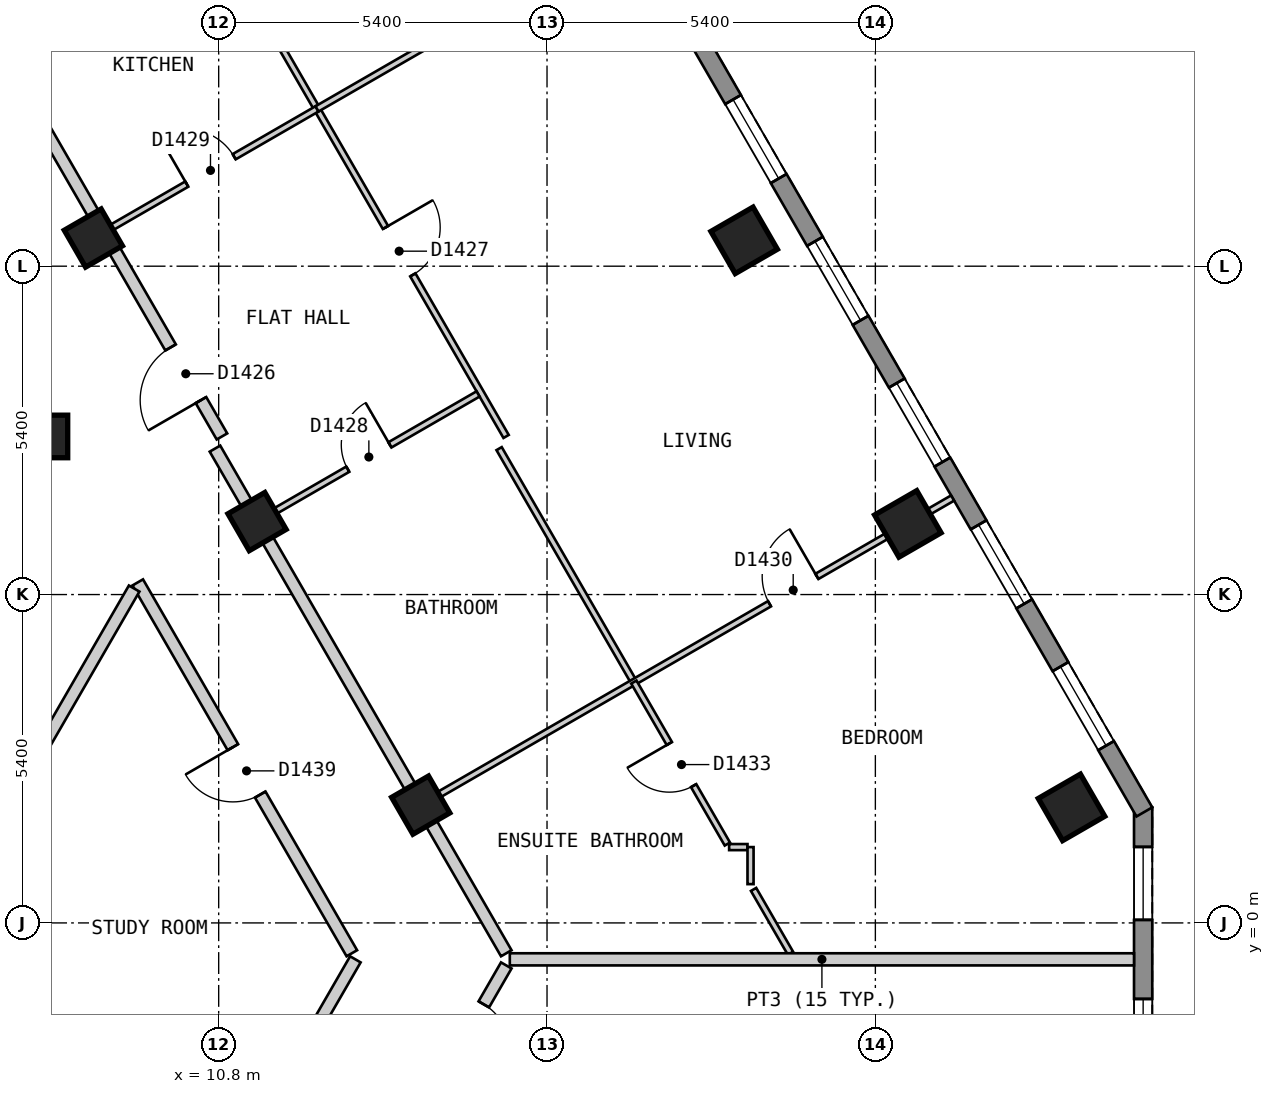
"""IFC4 building model, lengths in metres.
Left out: names, types, materials, properties, quantities, classifications, styles, units other than length and angle.
Written with IfcOpenShell. Run it as: python <this file> out.ifc"""

import sys

from ifc_helpers import new_model, si_unit, direction, frame, frame_2d, origin, origin_2d, place, context, subcontext, project, spatial, polyline, rectangle, outline, extrude, element, fill, save


model = new_model("IFC4")
c1 = context("Model", 3, precision=1e-05, world=origin(), true_north=direction((0.0, 1.0)))
c2 = subcontext(c1, "Body", "Model", "MODEL_VIEW")
j1 = project(units=[si_unit("LENGTHUNIT", "METRE"), si_unit("PLANEANGLEUNIT", "RADIAN")], contexts=[c1])
p1 = place(None, origin())
s1 = spatial("IfcSite", under=j1, at=p1, CompositionType="ELEMENT")
p2 = place(p1, origin())
s2 = spatial("IfcBuilding", under=s1, at=p2, CompositionType="ELEMENT")
p3 = place(p2, frame((0.0, 0.0, 178.2)))
s3 = spatial("IfcBuildingStorey", under=s2, at=p3, CompositionType="ELEMENT", Elevation=178.2)
for number, where, z_axis, x_axis in (
    (1, (24.826, 1.9, 0.0), (0.0, 0.0, 1.0), (-0.5, 0.866, 0.0)),
    (2, (22.134, 6.562, 0.0), (0.0, 0.0, 1.0), (-0.5, 0.866, 0.0)),
    (3, (19.442, 11.225, 0.0), (0.0, 0.0, 1.0), (-0.5, 0.866, 0.0)),
):
    element("IfcColumn", number, at=place(p3, frame(where, z_axis=z_axis, x_axis=x_axis)), inside=s3, PredefinedType="COLUMN", context=c2, shape_type="SweptSolid", body=[
        extrude(rectangle(XDim=0.8, YDim=0.8, at=origin_2d()), origin(), (0.0, 0.0, 1.0), 3.0),
    ])
for number, where, z_axis, x_axis in (
    (4, (14.123, 1.937, 0.0), (0.0, 0.0, 1.0), (-0.5, 0.866, 0.0)),
    (5, (11.431, 6.6, 0.0), (0.0, 0.0, 1.0), (-0.5, 0.866, 0.0)),
    (6, (7.967, 8.0, 0.0), (0.0, 0.0, 1.0), (1.0, 0.0, 0.0)),
    (7, (8.739, 11.263, 0.0), (0.0, 0.0, 1.0), (-0.5, 0.866, 0.0)),
):
    element("IfcColumn", number, at=place(p3, frame(where, z_axis=z_axis, x_axis=x_axis)), inside=s3, PredefinedType="COLUMN", context=c2, shape_type="SweptSolid", body=[
        extrude(rectangle(XDim=0.7, YDim=0.7, at=origin_2d()), origin(), (0.0, 0.0, 1.0), 3.0),
    ])
p4 = place(p3, frame((26.004, -3.1, 0.0), z_axis=(0.0, 0.0, 1.0), x_axis=(0.0, 1.0, 0.0)))
e8 = element("IfcWall", 8, at=p4, inside=s3, PredefinedType="SOLIDWALL", context=c2, shape_type="SweptSolid", body=[
    extrude(outline(polyline([(0.0, -0.15), (5.0, -0.15), (4.92, 0.15), (0.08, 0.15), (0.0, -0.15)])), origin(), (0.0, 0.0, 1.0), 2.7),
])
p5 = place(p4, frame((0.65, 0.0, 0.15)))
e9 = element("IfcOpeningElement", 9, at=p5, cuts=e8, PredefinedType="OPENING", context=c2, shape_type="SweptSolid", body=[
    extrude(rectangle(XDim=1.2, YDim=2.1, at=frame_2d((0.6, 1.05))), frame((0.0, 0.16, 0.0), z_axis=(0.0, -1.0, 0.0), x_axis=(1.0, 0.0, 0.0)), (0.0, 0.0, 1.0), 0.32),
])
p6 = place(p4, frame((3.15, 0.0, 0.15)))
e10 = element("IfcOpeningElement", 10, at=p6, cuts=e8, PredefinedType="OPENING", context=c2, shape_type="SweptSolid", body=[
    extrude(rectangle(XDim=1.2, YDim=2.1, at=frame_2d((0.6, 1.05))), frame((0.0, 0.16, 0.0), z_axis=(0.0, -1.0, 0.0), x_axis=(1.0, 0.0, 0.0)), (0.0, 0.0, 1.0), 0.32),
])
p7 = place(p3, frame((26.024, 1.825, 0.0), z_axis=(0.0, 0.0, 1.0), x_axis=(-0.500010537973, 0.866019319597, 0.0)))
e11 = element("IfcWall", 11, at=p7, inside=s3, PredefinedType="SOLIDWALL", context=c2, shape_type="SweptSolid", body=[
    extrude(outline(polyline([(0.0, -0.15), (22.863, -0.15), (22.783, 0.15), (0.08, 0.15), (0.0, -0.15)])), origin(), (0.0, 0.0, 1.0), 2.7),
])
p8 = place(p7, frame((1.259, 0.0, 0.15)))
e12 = element("IfcOpeningElement", 12, at=p8, cuts=e11, PredefinedType="OPENING", context=c2, shape_type="SweptSolid", body=[
    extrude(rectangle(XDim=1.5, YDim=2.1, at=frame_2d((0.75, 1.05))), frame((0.0, 0.16, 0.0), z_axis=(0.0, -1.0, 0.0), x_axis=(1.0, 0.0, 0.0)), (0.0, 0.0, 1.0), 0.32),
])
p9 = place(p7, frame((3.952, 0.0, 0.15)))
e13 = element("IfcOpeningElement", 13, at=p9, cuts=e11, PredefinedType="OPENING", context=c2, shape_type="SweptSolid", body=[
    extrude(rectangle(XDim=1.5, YDim=2.1, at=frame_2d((0.75, 1.05))), frame((0.0, 0.16, 0.0), z_axis=(0.0, -1.0, 0.0), x_axis=(1.0, 0.0, 0.0)), (0.0, 0.0, 1.0), 0.32),
])
p10 = place(p7, frame((6.644, 0.0, 0.15)))
e14 = element("IfcOpeningElement", 14, at=p10, cuts=e11, PredefinedType="OPENING", context=c2, shape_type="SweptSolid", body=[
    extrude(rectangle(XDim=1.5, YDim=2.1, at=frame_2d((0.75, 1.05))), frame((0.0, 0.16, 0.0), z_axis=(0.0, -1.0, 0.0), x_axis=(1.0, 0.0, 0.0)), (0.0, 0.0, 1.0), 0.32),
])
p11 = place(p7, frame((9.335, 0.0, 0.15)))
e15 = element("IfcOpeningElement", 15, at=p11, cuts=e11, PredefinedType="OPENING", context=c2, shape_type="SweptSolid", body=[
    extrude(rectangle(XDim=1.5, YDim=2.1, at=frame_2d((0.75, 1.05))), frame((0.0, 0.16, 0.0), z_axis=(0.0, -1.0, 0.0), x_axis=(1.0, 0.0, 0.0)), (0.0, 0.0, 1.0), 0.32),
])
p12 = place(p7, frame((12.028, 0.0, 0.15)))
e16 = element("IfcOpeningElement", 16, at=p12, cuts=e11, PredefinedType="OPENING", context=c2, shape_type="SweptSolid", body=[
    extrude(rectangle(XDim=1.5, YDim=2.1, at=frame_2d((0.75, 1.05))), frame((0.0, 0.16, 0.0), z_axis=(0.0, -1.0, 0.0), x_axis=(1.0, 0.0, 0.0)), (0.0, 0.0, 1.0), 0.32),
])
p13 = place(p7, frame((14.72, 0.0, 0.15)))
e17 = element("IfcOpeningElement", 17, at=p13, cuts=e11, PredefinedType="OPENING", context=c2, shape_type="SweptSolid", body=[
    extrude(rectangle(XDim=1.5, YDim=2.1, at=frame_2d((0.75, 1.05))), frame((0.0, 0.16, 0.0), z_axis=(0.0, -1.0, 0.0), x_axis=(1.0, 0.0, 0.0)), (0.0, 0.0, 1.0), 0.32),
])
p14 = place(p7, frame((17.411, 0.0, 0.15)))
e18 = element("IfcOpeningElement", 18, at=p14, cuts=e11, PredefinedType="OPENING", context=c2, shape_type="SweptSolid", body=[
    extrude(rectangle(XDim=1.5, YDim=2.1, at=frame_2d((0.75, 1.05))), frame((0.0, 0.16, 0.0), z_axis=(0.0, -1.0, 0.0), x_axis=(1.0, 0.0, 0.0)), (0.0, 0.0, 1.0), 0.32),
])
p15 = place(p7, frame((20.104, 0.0, 0.15)))
e19 = element("IfcOpeningElement", 19, at=p15, cuts=e11, PredefinedType="OPENING", context=c2, shape_type="SweptSolid", body=[
    extrude(rectangle(XDim=1.5, YDim=2.1, at=frame_2d((0.75, 1.05))), frame((0.0, 0.16, 0.0), z_axis=(0.0, -1.0, 0.0), x_axis=(1.0, 0.0, 0.0)), (0.0, 0.0, 1.0), 0.32),
])
p16 = place(p3, frame((9.469, 5.6, 0.0), z_axis=(0.0, 0.0, 1.0), x_axis=(0.499964524401, -0.866045884662, 0.0)))
e20 = element("IfcWall", 20, at=p16, inside=s3, PredefinedType="PARTITIONING", context=c2, shape_type="SweptSolid", body=[
    extrude(rectangle(XDim=7.042, YDim=0.2, at=frame_2d((3.521, 0.0))), origin(), (0.0, 0.0, 1.0), 2.7),
])
p17 = place(p16, frame((3.129, 0.0, 0.0)))
e21 = element("IfcOpeningElement", 21, at=p17, cuts=e20, PredefinedType="OPENING", context=c2, shape_type="SweptSolid", body=[
    extrude(rectangle(XDim=0.9, YDim=2.1, at=frame_2d((0.45, 1.05))), frame((0.0, 0.11, 0.0), z_axis=(0.0, -1.0, 0.0), x_axis=(1.0, 0.0, 0.0)), (0.0, 0.0, 1.0), 0.22),
])
p18 = place(p3, frame((10.739, 7.8, 0.0), z_axis=(0.0, 0.0, 1.0), x_axis=(0.499964311759, -0.86604600742, 0.0)))
e22 = element("IfcWall", 22, at=p18, inside=s3, PredefinedType="PARTITIONING", context=c2, shape_type="SweptSolid", body=[
    extrude(rectangle(XDim=9.583, YDim=0.2, at=frame_2d((4.792, 0.0))), origin(), (0.0, 0.0, 1.0), 2.7),
])
p19 = place(p3, frame((5.485, 17.3, 0.0), z_axis=(0.0, 0.0, 1.0), x_axis=(0.499965832213, -0.866045129667, 0.0)))
e23 = element("IfcWall", 23, at=p19, inside=s3, PredefinedType="PARTITIONING", context=c2, shape_type="SweptSolid", body=[
    extrude(rectangle(XDim=10.739, YDim=0.2, at=frame_2d((5.369, 0.0))), origin(), (0.0, 0.0, 1.0), 2.7),
])
p20 = place(p19, frame((9.048, 0.0, 0.0)))
e24 = element("IfcOpeningElement", 24, at=p20, cuts=e23, PredefinedType="OPENING", context=c2, shape_type="SweptSolid", body=[
    extrude(rectangle(XDim=1.0, YDim=2.1, at=frame_2d((0.5, 1.05))), frame((0.0, 0.11, 0.0), z_axis=(0.0, -1.0, 0.0), x_axis=(1.0, 0.0, 0.0)), (0.0, 0.0, 1.0), 0.22),
])
p21 = place(p19, frame((0.161, 0.0, 0.0)))
e25 = element("IfcOpeningElement", 25, at=p21, cuts=e23, PredefinedType="OPENING", context=c2, shape_type="SweptSolid", body=[
    extrude(rectangle(XDim=0.9, YDim=2.1, at=frame_2d((0.45, 1.05))), frame((0.0, 0.11, 0.0), z_axis=(0.0, -1.0, 0.0), x_axis=(1.0, 0.0, 0.0)), (0.0, 0.0, 1.0), 0.22),
])
p22 = place(p3, frame((7.028, 1.373, 0.0), z_axis=(0.0, 0.0, 1.0), x_axis=(0.499953126767, 0.866052464367, 0.0)))
e26 = element("IfcWall", 26, at=p22, inside=s3, PredefinedType="PARTITIONING", context=c2, shape_type="SweptSolid", body=[
    extrude(rectangle(XDim=4.764, YDim=0.2, at=frame_2d((2.382, 0.0))), origin(), (0.0, 0.0, 1.0), 2.7),
])
p23 = place(p3, frame((11.777, -2.8, 0.0), z_axis=(0.0, 0.0, 1.0), x_axis=(0.500085537782, 0.86597601289, 0.0)))
e27 = element("IfcWall", 27, at=p23, inside=s3, PredefinedType="PARTITIONING", context=c2, shape_type="SweptSolid", body=[
    extrude(rectangle(XDim=2.542, YDim=0.2, at=frame_2d((1.271, 0.0))), origin(), (0.0, 0.0, 1.0), 2.7),
])
p24 = place(p3, frame((14.318, -2.8, 0.0), z_axis=(0.0, 0.0, 1.0), x_axis=(0.49964693309, 0.866229151122, 0.0)))
e28 = element("IfcWall", 28, at=p24, inside=s3, PredefinedType="PARTITIONING", context=c2, shape_type="SweptSolid", body=[
    extrude(rectangle(XDim=2.426, YDim=0.2, at=frame_2d((1.213, 0.0))), origin(), (0.0, 0.0, 1.0), 2.7),
])
p25 = place(p24, frame((0.886, 0.0, 0.0)))
e29 = element("IfcOpeningElement", 29, at=p25, cuts=e28, PredefinedType="OPENING", context=c2, shape_type="SweptSolid", body=[
    extrude(rectangle(XDim=0.8, YDim=2.1, at=frame_2d((0.4, 1.05))), frame((0.0, 0.11, 0.0), z_axis=(0.0, -1.0, 0.0), x_axis=(1.0, 0.0, 0.0)), (0.0, 0.0, 1.0), 0.22),
])
p26 = place(p3, frame((15.412, 7.8, 0.0), z_axis=(0.0, 0.0, 1.0), x_axis=(0.499882970317, -0.866092960361, 0.0)))
e30 = element("IfcWall", 30, at=p26, inside=s3, PredefinedType="PARTITIONING", context=c2, shape_type="SweptSolid", body=[
    extrude(rectangle(XDim=4.433, YDim=0.1, at=frame_2d((2.216, 0.0))), origin(), (0.0, 0.0, 1.0), 2.7),
])
p27 = place(p3, frame((19.597, 0.551, 0.0), z_axis=(0.0, 0.0, 1.0), x_axis=(0.500576018574, -0.86569258379, 0.0)))
e31 = element("IfcWall", 31, at=p27, inside=s3, PredefinedType="PARTITIONING", context=c2, shape_type="SweptSolid", body=[
    extrude(rectangle(XDim=1.213, YDim=0.1, at=frame_2d((0.606, 0.0))), origin(), (0.0, 0.0, 1.0), 2.7),
])
p28 = place(p3, frame((9.827, 17.874, 0.0), z_axis=(0.0, 0.0, 1.0), x_axis=(0.499962189394, -0.866047232647, 0.0)))
e32 = element("IfcWall", 32, at=p28, inside=s3, PredefinedType="PARTITIONING", context=c2, shape_type="SweptSolid", body=[
    extrude(rectangle(XDim=11.401, YDim=0.1, at=frame_2d((5.701, 0.0))), origin(), (0.0, 0.0, 1.0), 2.7),
])
p29 = place(p28, frame((7.433, 0.0, 0.0)))
e33 = element("IfcOpeningElement", 33, at=p29, cuts=e32, PredefinedType="OPENING", context=c2, shape_type="SweptSolid", body=[
    extrude(rectangle(XDim=0.9, YDim=2.1, at=frame_2d((0.45, 1.05))), frame((0.0, 0.06, 0.0), z_axis=(0.0, -1.0, 0.0), x_axis=(1.0, 0.0, 0.0)), (0.0, 0.0, 1.0), 0.12),
])
p30 = place(p3, frame((19.195, 1.247, 0.0), z_axis=(0.0, 0.0, 1.0), x_axis=(1.0, 0.0, 0.0)))
e34 = element("IfcWall", 34, at=p30, inside=s3, PredefinedType="PARTITIONING", context=c2, shape_type="SweptSolid", body=[
    extrude(rectangle(XDim=0.302, YDim=0.1, at=frame_2d((0.151, 0.0))), origin(), (0.0, 0.0, 1.0), 2.7),
])
p31 = place(p3, frame((19.547, 0.638, 0.0), z_axis=(0.0, 0.0, 1.0), x_axis=(0.0, 1.0, 0.0)))
e35 = element("IfcWall", 35, at=p31, inside=s3, PredefinedType="PARTITIONING", context=c2, shape_type="SweptSolid", body=[
    extrude(rectangle(XDim=0.609, YDim=0.1, at=frame_2d((0.305, 0.0))), origin(), (0.0, 0.0, 1.0), 2.7),
])
p32 = place(p3, frame((14.21, 1.987, 0.0), z_axis=(0.0, 0.0, 1.0), x_axis=(0.866022959057, 0.500004234368, 0.0)))
e36 = element("IfcWall", 36, at=p32, inside=s3, PredefinedType="PARTITIONING", context=c2, shape_type="SweptSolid", body=[
    extrude(rectangle(XDim=10.0, YDim=0.1, at=frame_2d((5.0, 0.0))), origin(), (0.0, 0.0, 1.0), 2.7),
])
p33 = place(p32, frame((6.523, 0.0, 0.0)))
e37 = element("IfcOpeningElement", 37, at=p33, cuts=e36, PredefinedType="OPENING", context=c2, shape_type="SweptSolid", body=[
    extrude(rectangle(XDim=0.9, YDim=2.1, at=frame_2d((0.45, 1.05))), frame((0.0, 0.06, 0.0), z_axis=(0.0, -1.0, 0.0), x_axis=(1.0, 0.0, 0.0)), (0.0, 0.0, 1.0), 0.12),
])
p34 = place(p3, frame((11.518, 6.65, 0.0), z_axis=(0.0, 0.0, 1.0), x_axis=(0.865949381454, 0.500131651427, 0.0)))
e38 = element("IfcWall", 38, at=p34, inside=s3, PredefinedType="PARTITIONING", context=c2, shape_type="SweptSolid", body=[
    extrude(rectangle(XDim=4.097, YDim=0.1, at=frame_2d((2.049, 0.0))), origin(), (0.0, 0.0, 1.0), 2.7),
])
p35 = place(p34, frame((1.623, 0.0, 0.0)))
e39 = element("IfcOpeningElement", 39, at=p35, cuts=e38, PredefinedType="OPENING", context=c2, shape_type="SweptSolid", body=[
    extrude(rectangle(XDim=0.8, YDim=2.1, at=frame_2d((0.4, 1.05))), frame((0.0, 0.06, 0.0), z_axis=(0.0, -1.0, 0.0), x_axis=(1.0, 0.0, 0.0)), (0.0, 0.0, 1.0), 0.12),
])
p36 = place(p3, frame((8.999, 11.413, 0.0), z_axis=(0.0, 0.0, 1.0), x_axis=(0.865969252911, 0.500097243556, 0.0)))
e40 = element("IfcWall", 40, at=p36, inside=s3, PredefinedType="PARTITIONING", context=c2, shape_type="SweptSolid", body=[
    extrude(rectangle(XDim=3.947, YDim=0.1, at=frame_2d((1.974, 0.0))), origin(), (0.0, 0.0, 1.0), 2.7),
])
p37 = place(p36, frame((1.474, 0.0, 0.0)))
e41 = element("IfcOpeningElement", 41, at=p37, cuts=e40, PredefinedType="OPENING", context=c2, shape_type="SweptSolid", body=[
    extrude(rectangle(XDim=0.9, YDim=2.1, at=frame_2d((0.45, 1.05))), frame((0.0, 0.06, 0.0), z_axis=(0.0, -1.0, 0.0), x_axis=(1.0, 0.0, 0.0)), (0.0, 0.0, 1.0), 0.12),
])
p38 = place(p3, frame((15.588, -0.599, 0.0), z_axis=(0.0, 0.0, 1.0), x_axis=(1.0, 0.0, 0.0)))
e42 = element("IfcWall", 42, at=p38, inside=s3, PredefinedType="PARTITIONING", context=c2, shape_type="SweptSolid", body=[
    extrude(rectangle(XDim=10.266, YDim=0.2, at=frame_2d((5.133, 0.0))), origin(), (0.0, 0.0, 1.0), 2.7),
])
p39 = place(p3, frame((7.448, 14.1, 0.0), z_axis=(0.0, 0.0, 1.0), x_axis=(0.500013426303, 0.866017651966, 0.0)))
e43 = element("IfcWall", 43, at=p39, inside=s3, PredefinedType="PARTITIONING", context=c2, shape_type="SweptSolid", body=[
    extrude(rectangle(XDim=4.358, YDim=0.2, at=frame_2d((2.179, 0.0))), origin(), (0.0, 0.0, 1.0), 2.7),
])
p40 = place(p3, frame((17.628, 3.961, 0.0), z_axis=(0.0, 0.0, 1.0), x_axis=(0.50003162148, -0.866007146345, 0.0)))
e44 = element("IfcWall", 44, at=p40, inside=s3, PredefinedType="PARTITIONING", context=c2, shape_type="SweptSolid", body=[
    extrude(rectangle(XDim=3.076, YDim=0.1, at=frame_2d((1.538, 0.0))), origin(), (0.0, 0.0, 1.0), 2.7),
])
p41 = place(p40, frame((1.167, 0.0, 0.0)))
e45 = element("IfcOpeningElement", 45, at=p41, cuts=e44, PredefinedType="OPENING", context=c2, shape_type="SweptSolid", body=[
    extrude(rectangle(XDim=0.8, YDim=2.1, at=frame_2d((0.4, 1.05))), frame((0.0, 0.06, 0.0), z_axis=(0.0, -1.0, 0.0), x_axis=(1.0, 0.0, 0.0)), (0.0, 0.0, 1.0), 0.12),
])
p42 = place(p3, frame((12.417, 13.387, 0.0), z_axis=(0.0, 0.0, 1.0), x_axis=(0.866070981966, 0.499921047963, 0.0)))
e46 = element("IfcWall", 46, at=p42, inside=s3, PredefinedType="PARTITIONING", context=c2, shape_type="SweptSolid", body=[
    extrude(rectangle(XDim=5.853, YDim=0.1, at=frame_2d((2.927, 0.0))), origin(), (0.0, 0.0, 1.0), 2.7),
])
p43 = place(p42, frame((2.476, 0.0, 0.0)))
e47 = element("IfcOpeningElement", 47, at=p43, cuts=e46, PredefinedType="OPENING", context=c2, shape_type="SweptSolid", body=[
    extrude(rectangle(XDim=0.9, YDim=2.1, at=frame_2d((0.45, 1.05))), frame((0.0, 0.06, 0.0), z_axis=(0.0, -1.0, 0.0), x_axis=(1.0, 0.0, 0.0)), (0.0, 0.0, 1.0), 0.12),
])
p44 = place(p5, origin())
e48 = element("IfcWindow", 48, at=p44, inside=s3, PartitioningType="SINGLE_PANEL", PredefinedType="WINDOW", context=c2, shape_type="SweptSolid", body=[
    extrude(rectangle(XDim=1.2, YDim=2.1, at=frame_2d((0.6, 1.05))), frame((0.0, 0.03, 0.0), z_axis=(0.0, -1.0, 0.0), x_axis=(1.0, 0.0, 0.0)), (0.0, 0.0, 1.0), 0.06),
])
fill(e9, e48)
p45 = place(p6, origin())
e49 = element("IfcWindow", 49, at=p45, inside=s3, PartitioningType="SINGLE_PANEL", PredefinedType="WINDOW", context=c2, shape_type="SweptSolid", body=[
    extrude(rectangle(XDim=1.2, YDim=2.1, at=frame_2d((0.6, 1.05))), frame((0.0, 0.03, 0.0), z_axis=(0.0, -1.0, 0.0), x_axis=(1.0, 0.0, 0.0)), (0.0, 0.0, 1.0), 0.06),
])
fill(e10, e49)
p46 = place(p8, origin())
e50 = element("IfcWindow", 50, at=p46, inside=s3, PartitioningType="SINGLE_PANEL", PredefinedType="WINDOW", context=c2, shape_type="SweptSolid", body=[
    extrude(rectangle(XDim=1.5, YDim=2.1, at=frame_2d((0.75, 1.05))), frame((0.0, 0.03, 0.0), z_axis=(0.0, -1.0, 0.0), x_axis=(1.0, 0.0, 0.0)), (0.0, 0.0, 1.0), 0.06),
])
fill(e12, e50)
p47 = place(p9, origin())
e51 = element("IfcWindow", 51, at=p47, inside=s3, PartitioningType="SINGLE_PANEL", PredefinedType="WINDOW", context=c2, shape_type="SweptSolid", body=[
    extrude(rectangle(XDim=1.5, YDim=2.1, at=frame_2d((0.75, 1.05))), frame((0.0, 0.03, 0.0), z_axis=(0.0, -1.0, 0.0), x_axis=(1.0, 0.0, 0.0)), (0.0, 0.0, 1.0), 0.06),
])
fill(e13, e51)
p48 = place(p10, origin())
e52 = element("IfcWindow", 52, at=p48, inside=s3, PartitioningType="SINGLE_PANEL", PredefinedType="WINDOW", context=c2, shape_type="SweptSolid", body=[
    extrude(rectangle(XDim=1.5, YDim=2.1, at=frame_2d((0.75, 1.05))), frame((0.0, 0.03, 0.0), z_axis=(0.0, -1.0, 0.0), x_axis=(1.0, 0.0, 0.0)), (0.0, 0.0, 1.0), 0.06),
])
fill(e14, e52)
p49 = place(p11, origin())
e53 = element("IfcWindow", 53, at=p49, inside=s3, PartitioningType="SINGLE_PANEL", PredefinedType="WINDOW", context=c2, shape_type="SweptSolid", body=[
    extrude(rectangle(XDim=1.5, YDim=2.1, at=frame_2d((0.75, 1.05))), frame((0.0, 0.03, 0.0), z_axis=(0.0, -1.0, 0.0), x_axis=(1.0, 0.0, 0.0)), (0.0, 0.0, 1.0), 0.06),
])
fill(e15, e53)
p50 = place(p12, origin())
e54 = element("IfcWindow", 54, at=p50, inside=s3, PartitioningType="SINGLE_PANEL", PredefinedType="WINDOW", context=c2, shape_type="SweptSolid", body=[
    extrude(rectangle(XDim=1.5, YDim=2.1, at=frame_2d((0.75, 1.05))), frame((0.0, 0.03, 0.0), z_axis=(0.0, -1.0, 0.0), x_axis=(1.0, 0.0, 0.0)), (0.0, 0.0, 1.0), 0.06),
])
fill(e16, e54)
p51 = place(p25, origin())
e55 = element("IfcDoor", 55, at=p51, inside=s3, OperationType="SINGLE_SWING_LEFT", PredefinedType="DOOR", context=c2, shape_type="SweptSolid", body=[
    extrude(rectangle(XDim=0.8, YDim=2.1, at=frame_2d((0.4, 1.05))), frame((0.0, 0.025, 0.0), z_axis=(0.0, -1.0, 0.0), x_axis=(1.0, 0.0, 0.0)), (0.0, 0.0, 1.0), 0.05),
])
fill(e29, e55)
p52 = place(p20, origin())
e56 = element("IfcDoor", 56, at=p52, inside=s3, OperationType="SINGLE_SWING_RIGHT", PredefinedType="DOOR", context=c2, shape_type="SweptSolid", body=[
    extrude(rectangle(XDim=1.0, YDim=2.1, at=frame_2d((0.5, 1.05))), frame((0.0, 0.025, 0.0), z_axis=(0.0, -1.0, 0.0), x_axis=(1.0, 0.0, 0.0)), (0.0, 0.0, 1.0), 0.05),
])
fill(e24, e56)
p53 = place(p29, origin())
e57 = element("IfcDoor", 57, at=p53, inside=s3, OperationType="SINGLE_SWING_LEFT", PredefinedType="DOOR", context=c2, shape_type="SweptSolid", body=[
    extrude(rectangle(XDim=0.9, YDim=2.1, at=frame_2d((0.45, 1.05))), frame((0.0, 0.025, 0.0), z_axis=(0.0, -1.0, 0.0), x_axis=(1.0, 0.0, 0.0)), (0.0, 0.0, 1.0), 0.05),
])
fill(e33, e57)
p54 = place(p35, origin())
e58 = element("IfcDoor", 58, at=p54, inside=s3, OperationType="SINGLE_SWING_RIGHT", PredefinedType="DOOR", context=c2, shape_type="SweptSolid", body=[
    extrude(rectangle(XDim=0.8, YDim=2.1, at=frame_2d((0.4, 1.05))), frame((0.0, 0.025, 0.0), z_axis=(0.0, -1.0, 0.0), x_axis=(1.0, 0.0, 0.0)), (0.0, 0.0, 1.0), 0.05),
])
fill(e39, e58)
p55 = place(p37, origin())
e59 = element("IfcDoor", 59, at=p55, inside=s3, OperationType="SINGLE_SWING_LEFT", PredefinedType="DOOR", context=c2, shape_type="SweptSolid", body=[
    extrude(rectangle(XDim=0.9, YDim=2.1, at=frame_2d((0.45, 1.05))), frame((0.0, 0.025, 0.0), z_axis=(0.0, -1.0, 0.0), x_axis=(1.0, 0.0, 0.0)), (0.0, 0.0, 1.0), 0.05),
])
fill(e41, e59)
p56 = place(p33, origin())
e60 = element("IfcDoor", 60, at=p56, inside=s3, OperationType="SINGLE_SWING_RIGHT", PredefinedType="DOOR", context=c2, shape_type="SweptSolid", body=[
    extrude(rectangle(XDim=0.9, YDim=2.1, at=frame_2d((0.45, 1.05))), frame((0.0, 0.025, 0.0), z_axis=(0.0, -1.0, 0.0), x_axis=(1.0, 0.0, 0.0)), (0.0, 0.0, 1.0), 0.05),
])
fill(e37, e60)
p57 = place(p41, origin())
e61 = element("IfcDoor", 61, at=p57, inside=s3, OperationType="SINGLE_SWING_LEFT", PredefinedType="DOOR", context=c2, shape_type="SweptSolid", body=[
    extrude(rectangle(XDim=0.8, YDim=2.1, at=frame_2d((0.4, 1.05))), frame((0.0, 0.025, 0.0), z_axis=(0.0, -1.0, 0.0), x_axis=(1.0, 0.0, 0.0)), (0.0, 0.0, 1.0), 0.05),
])
fill(e45, e61)
p58 = place(p17, origin())
e62 = element("IfcDoor", 62, at=p58, inside=s3, OperationType="SINGLE_SWING_LEFT", PredefinedType="DOOR", context=c2, shape_type="SweptSolid", body=[
    extrude(rectangle(XDim=0.9, YDim=2.1, at=frame_2d((0.45, 1.05))), frame((0.0, 0.025, 0.0), z_axis=(0.0, -1.0, 0.0), x_axis=(1.0, 0.0, 0.0)), (0.0, 0.0, 1.0), 0.05),
])
fill(e21, e62)
save(model, sys.argv[1])
